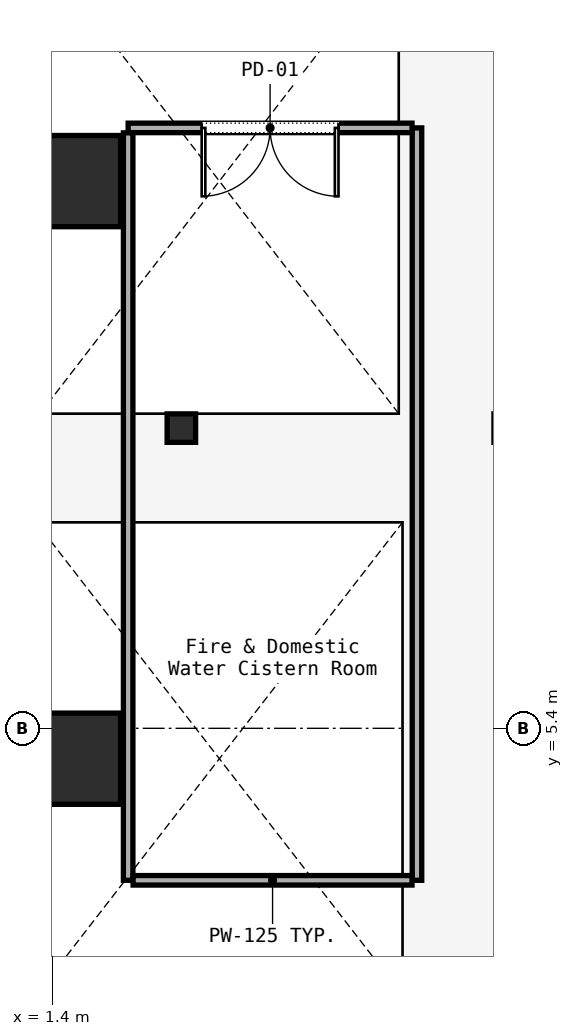
"""IFC4 building model, lengths in metres.
Left out: names, types, materials, properties, quantities, classifications, styles, units other than length and angle.
Written with IfcOpenShell. Run it as: python <this file> out.ifc"""

import sys

from ifc_helpers import new_model, si_unit, direction, frame, frame_2d, origin, origin_2d, place, context, subcontext, project, spatial, rectangle, i_section, extrude, element, fill, save


model = new_model("IFC4")
c1 = context("Model", 3, precision=1e-05, world=origin(), true_north=direction((0.0, 1.0)))
c2 = subcontext(c1, "Body", "Model", "MODEL_VIEW")
j1 = project(units=[si_unit("LENGTHUNIT", "METRE"), si_unit("PLANEANGLEUNIT", "RADIAN")], contexts=[c1])
p1 = place(None, origin())
s1 = spatial("IfcSite", under=j1, at=p1, CompositionType="ELEMENT")
p2 = place(p1, origin())
s2 = spatial("IfcBuilding", under=s1, at=p2, CompositionType="ELEMENT")
p3 = place(p2, frame((0.0, 0.0, -9.0)))
s3 = spatial("IfcBuildingStorey", under=s2, at=p3, CompositionType="ELEMENT", Elevation=-9.0)
for number, where, z_axis, x_axis in (
    (1, (1.7, 5.0, 0.0), (0.0, 0.0, 1.0), (1.0, 0.0, 0.0)),
    (2, (1.7, 12.6, 0.0), (0.0, 0.0, 1.0), (1.0, 0.0, 0.0)),
):
    element("IfcColumn", number, at=place(p3, frame(where, z_axis=z_axis, x_axis=x_axis)), inside=s3, PredefinedType="COLUMN", context=c2, shape_type="SweptSolid", body=[
        extrude(rectangle(XDim=1.2, YDim=1.2, at=origin_2d()), origin(), (0.0, 0.0, 1.0), 4.15),
    ])
p4 = place(p3, frame((3.1, 9.35, 0.0), z_axis=(0.0, 0.0, 1.0), x_axis=(1.0, 0.0, 0.0)))
e3 = element("IfcColumn", 3, at=p4, inside=s3, PredefinedType="COLUMN", context=c2, shape_type="SweptSolid", body=[
    extrude(i_section(OverallWidth=0.375, OverallDepth=0.375, WebThickness=0.017, FlangeThickness=0.027, FilletRadius=0.015, at=origin_2d()), origin(), (0.0, 0.0, 1.0), 4.5),
])
p5 = place(p3, frame((6.2, 3.4, 0.0), z_axis=(0.0, 0.0, 1.0), x_axis=(0.0, 1.0, 0.0)))
e4 = element("IfcWall", 4, at=p5, inside=s3, PredefinedType="PARTITIONING", context=c2, shape_type="SweptSolid", body=[
    extrude(rectangle(XDim=9.9, YDim=0.125, at=frame_2d((4.95, 0.0))), origin(), (0.0, 0.0, 1.0), 3.193),
])
p6 = place(p3, frame((6.135, 13.3, 0.0), z_axis=(0.0, 0.0, 1.0), x_axis=(-1.0, 0.0, 0.0)))
e5 = element("IfcWall", 5, at=p6, inside=s3, PredefinedType="PARTITIONING", context=c2, shape_type="SweptSolid", body=[
    extrude(rectangle(XDim=3.735, YDim=0.125, at=frame_2d((1.868, 0.0))), origin(), (0.0, 0.0, 1.0), 3.193),
])
p7 = place(p6, frame((0.968, 0.0, 0.0)))
e6 = element("IfcOpeningElement", 6, at=p7, cuts=e5, PredefinedType="OPENING", context=c2, shape_type="SweptSolid", body=[
    extrude(rectangle(XDim=1.8, YDim=2.3, at=frame_2d((0.9, 1.15))), frame((0.0, 0.062, 0.0), z_axis=(0.0, -1.0, 0.0), x_axis=(1.0, 0.0, 0.0)), (0.0, 0.0, 1.0), 0.125),
])
p8 = place(p3, frame((2.4, 13.235, 0.0), z_axis=(0.0, 0.0, 1.0), x_axis=(0.0, -1.0, 0.0)))
e7 = element("IfcWall", 7, at=p8, inside=s3, PredefinedType="PARTITIONING", context=c2, shape_type="SweptSolid", body=[
    extrude(rectangle(XDim=9.835, YDim=0.125, at=frame_2d((4.917, 0.0))), origin(), (0.0, 0.0, 1.0), 3.193),
])
p9 = place(p3, frame((2.465, 3.4, 0.0), z_axis=(0.0, 0.0, 1.0), x_axis=(1.0, 0.0, 0.0)))
e8 = element("IfcWall", 8, at=p9, inside=s3, PredefinedType="PARTITIONING", context=c2, shape_type="SweptSolid", body=[
    extrude(rectangle(XDim=3.67, YDim=0.125, at=frame_2d((1.835, 0.0))), origin(), (0.0, 0.0, 1.0), 3.193),
])
p10 = place(p7, origin())
e9 = element("IfcDoor", 9, at=p10, inside=s3, OperationType="SINGLE_SWING_RIGHT", PredefinedType="DOOR", context=c2, shape_type="SweptSolid", body=[
    extrude(rectangle(XDim=1.8, YDim=2.3, at=frame_2d((0.9, 1.15))), frame((0.0, 0.025, 0.0), z_axis=(0.0, -1.0, 0.0), x_axis=(1.0, 0.0, 0.0)), (0.0, 0.0, 1.0), 0.05),
])
fill(e6, e9)
save(model, sys.argv[1])
